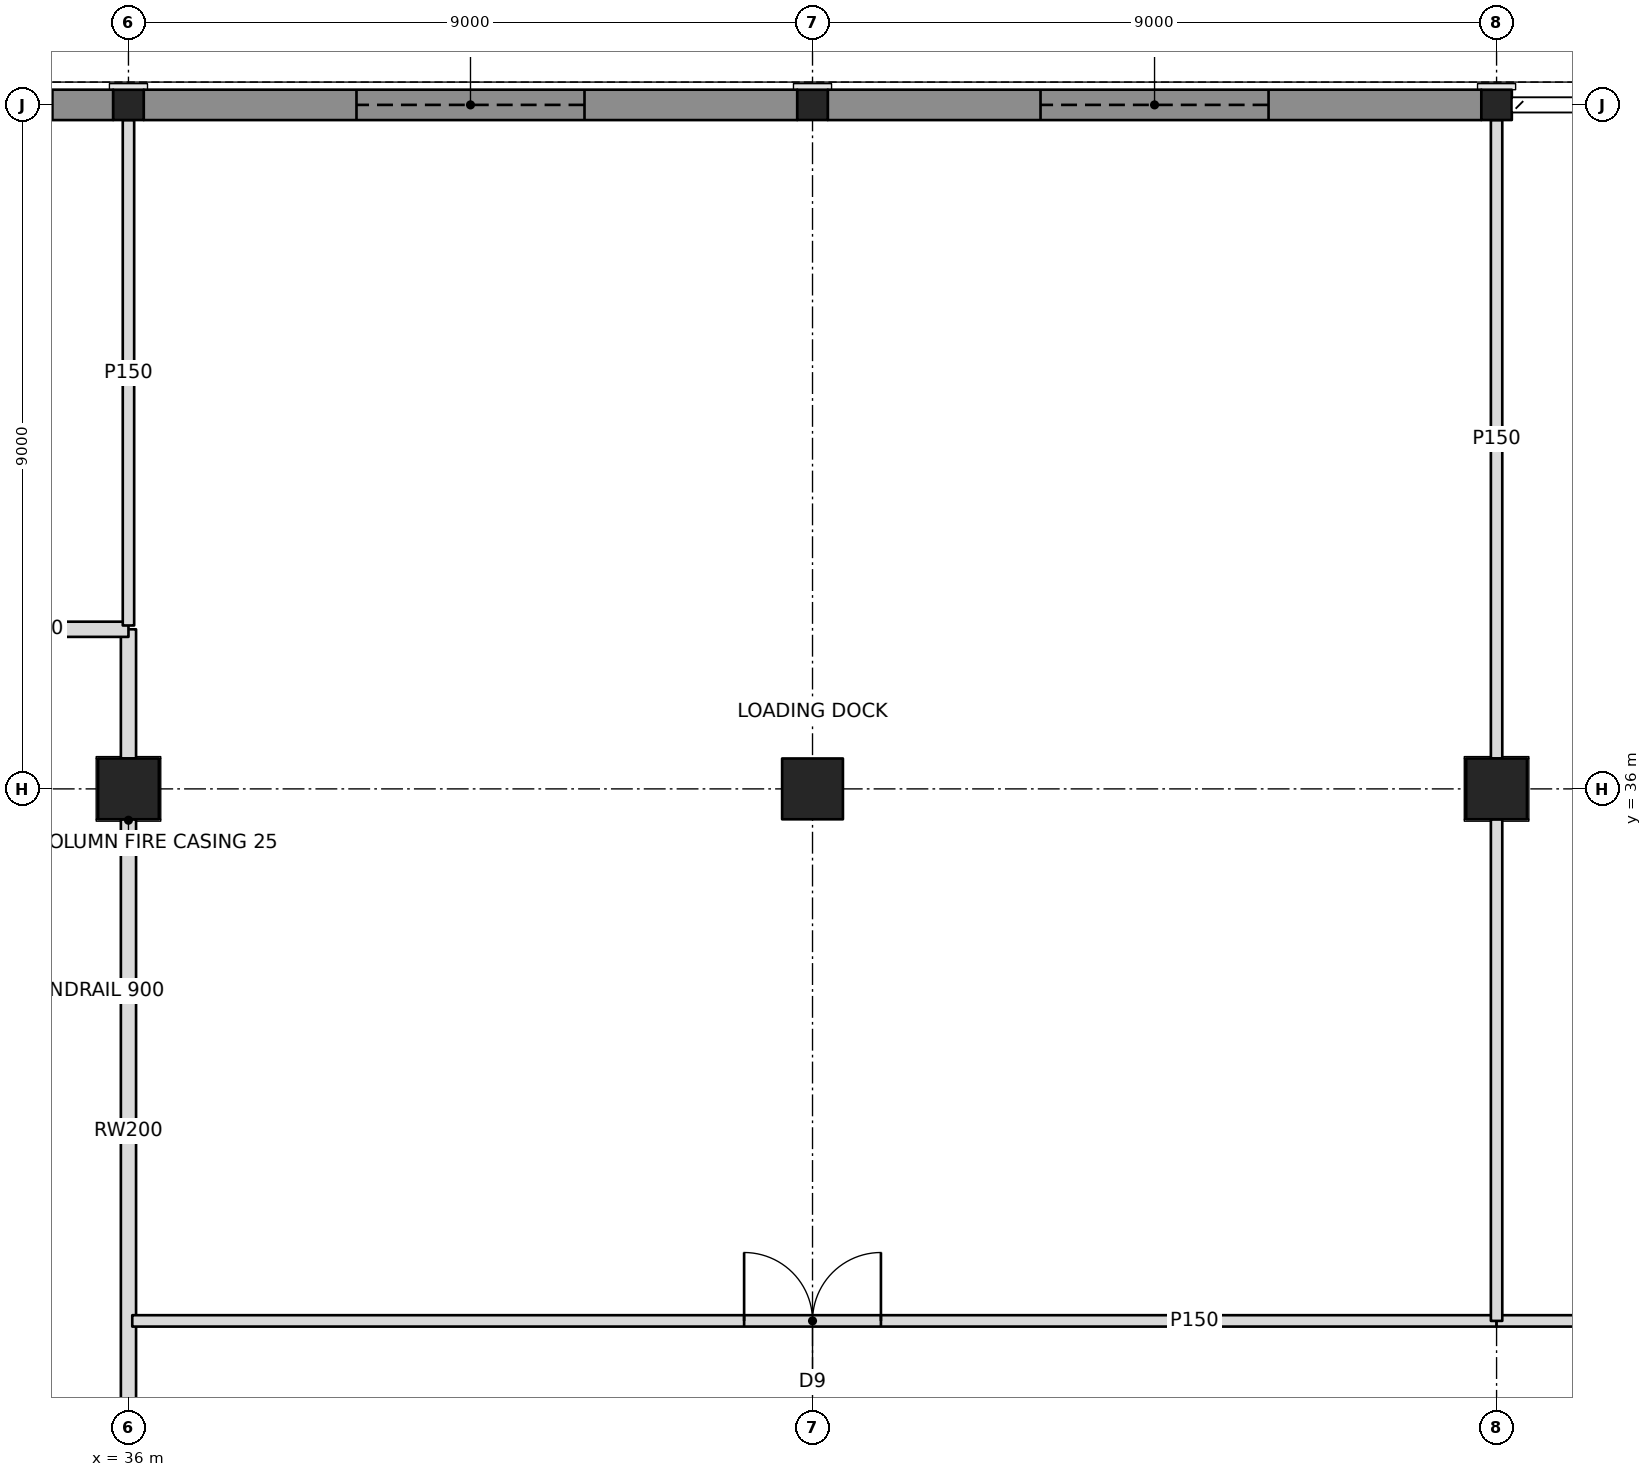
"""IFC4 building model, lengths in metres.
Left out: names, types, materials, properties, quantities, classifications, styles, units other than length and angle.
Written with IfcOpenShell. Run it as: python <this file> out.ifc"""

import sys

from ifc_helpers import new_model, si_unit, direction, frame, frame_2d, origin, origin_2d, place, context, subcontext, project, spatial, rectangle, hollow_rectangle, i_section, extrude, element, fill, save


model = new_model("IFC4")
c1 = context("Model", 3, precision=1e-05, world=origin(), true_north=direction((0.0, 1.0)))
c2 = subcontext(c1, "Body", "Model", "MODEL_VIEW")
j1 = project(units=[si_unit("LENGTHUNIT", "METRE"), si_unit("PLANEANGLEUNIT", "RADIAN")], contexts=[c1])
p1 = place(None, origin())
s1 = spatial("IfcSite", under=j1, at=p1, CompositionType="ELEMENT")
p2 = place(p1, origin())
s2 = spatial("IfcBuilding", under=s1, at=p2, CompositionType="ELEMENT")
p3 = place(p2, origin())
s3 = spatial("IfcBuildingStorey", under=s2, at=p3, CompositionType="ELEMENT", Elevation=0.0)
p4 = place(p3, frame((36.0, 36.0, 0.0), z_axis=(0.0, 0.0, 1.0), x_axis=(1.0, 0.0, 0.0)))
e1 = element("IfcColumn", 1, at=p4, inside=s3, PredefinedType="COLUMN", context=c2, shape_type="SweptSolid", body=[
    extrude(hollow_rectangle(XDim=0.8, YDim=0.8, WallThickness=0.1, at=origin_2d()), origin(), (0.0, 0.0, 1.0), 6.0),
])
p5 = place(p3, frame((36.0, 45.0, 0.0), z_axis=(0.0, 0.0, 1.0), x_axis=(1.0, 0.0, 0.0)))
e2 = element("IfcColumn", 2, at=p5, inside=s3, PredefinedType="COLUMN", context=c2, shape_type="SweptSolid", body=[
    extrude(i_section(OverallWidth=0.401, OverallDepth=0.399, WebThickness=0.025, FlangeThickness=0.04, at=origin_2d()), origin(), (0.0, 0.0, 1.0), 6.0),
])
p6 = place(p3, frame((45.0, 36.0, 0.0), z_axis=(0.0, 0.0, 1.0), x_axis=(1.0, 0.0, 0.0)))
e3 = element("IfcColumn", 3, at=p6, inside=s3, PredefinedType="COLUMN", context=c2, shape_type="SweptSolid", body=[
    extrude(hollow_rectangle(XDim=0.8, YDim=0.8, WallThickness=0.1, at=origin_2d()), origin(), (0.0, 0.0, 1.0), 6.0),
])
p7 = place(p3, frame((45.0, 45.0, 0.0), z_axis=(0.0, 0.0, 1.0), x_axis=(1.0, 0.0, 0.0)))
e4 = element("IfcColumn", 4, at=p7, inside=s3, PredefinedType="COLUMN", context=c2, shape_type="SweptSolid", body=[
    extrude(i_section(OverallWidth=0.401, OverallDepth=0.399, WebThickness=0.025, FlangeThickness=0.04, at=origin_2d()), origin(), (0.0, 0.0, 1.0), 6.0),
])
p8 = place(p3, frame((54.0, 36.0, 0.0), z_axis=(0.0, 0.0, 1.0), x_axis=(1.0, 0.0, 0.0)))
e5 = element("IfcColumn", 5, at=p8, inside=s3, PredefinedType="COLUMN", context=c2, shape_type="SweptSolid", body=[
    extrude(hollow_rectangle(XDim=0.8, YDim=0.8, WallThickness=0.1, at=origin_2d()), origin(), (0.0, 0.0, 1.0), 6.0),
])
p9 = place(p3, frame((54.0, 45.0, 0.0), z_axis=(0.0, 0.0, 1.0), x_axis=(1.0, 0.0, 0.0)))
e6 = element("IfcColumn", 6, at=p9, inside=s3, PredefinedType="COLUMN", context=c2, shape_type="SweptSolid", body=[
    extrude(i_section(OverallWidth=0.401, OverallDepth=0.399, WebThickness=0.025, FlangeThickness=0.04, at=origin_2d()), origin(), (0.0, 0.0, 1.0), 6.0),
])
p10 = place(p3, frame((35.799, 45.0, 0.0), z_axis=(0.0, 0.0, 1.0), x_axis=(-1.0, 0.0, 0.0)))
e7 = element("IfcWall", 7, at=p10, inside=s3, PredefinedType="SOLIDWALL", context=c2, shape_type="SweptSolid", body=[
    extrude(rectangle(XDim=8.599, YDim=0.4, at=frame_2d((4.299, 0.0))), origin(), (0.0, 0.0, 1.0), 5.054),
])
p11 = place(p10, frame((0.8, 0.0, 0.0)))
e8 = element("IfcOpeningElement", 8, at=p11, cuts=e7, PredefinedType="OPENING", context=c2, shape_type="SweptSolid", body=[
    extrude(rectangle(XDim=1.0, YDim=2.1, at=frame_2d((0.5, 1.05))), frame((0.0, 0.21, 0.0), z_axis=(0.0, -1.0, 0.0), x_axis=(1.0, 0.0, 0.0)), (0.0, 0.0, 1.0), 0.42),
])
p12 = place(p10, frame((3.2, 0.0, 0.0)))
e9 = element("IfcOpeningElement", 9, at=p12, cuts=e7, PredefinedType="OPENING", context=c2, shape_type="SweptSolid", body=[
    extrude(rectangle(XDim=2.4, YDim=2.7, at=frame_2d((1.2, 1.35))), frame((0.0, 0.21, 0.0), z_axis=(0.0, -1.0, 0.0), x_axis=(1.0, 0.0, 0.0)), (0.0, 0.0, 1.0), 0.42),
])
p13 = place(p3, frame((44.799, 45.0, 0.0), z_axis=(0.0, 0.0, 1.0), x_axis=(-1.0, 0.0, 0.0)))
e10 = element("IfcWall", 10, at=p13, inside=s3, PredefinedType="SOLIDWALL", context=c2, shape_type="SweptSolid", body=[
    extrude(rectangle(XDim=8.599, YDim=0.4, at=frame_2d((4.299, 0.0))), origin(), (0.0, 0.0, 1.0), 5.054),
])
p14 = place(p13, frame((2.799, 0.0, 0.0)))
e11 = element("IfcOpeningElement", 11, at=p14, cuts=e10, PredefinedType="OPENING", context=c2, shape_type="SweptSolid", body=[
    extrude(rectangle(XDim=3.0, YDim=4.2, at=frame_2d((1.5, 2.1))), frame((0.0, 0.21, 0.0), z_axis=(0.0, -1.0, 0.0), x_axis=(1.0, 0.0, 0.0)), (0.0, 0.0, 1.0), 0.42),
])
p15 = place(p3, frame((53.799, 45.0, 0.0), z_axis=(0.0, 0.0, 1.0), x_axis=(-1.0, 0.0, 0.0)))
e12 = element("IfcWall", 12, at=p15, inside=s3, PredefinedType="SOLIDWALL", context=c2, shape_type="SweptSolid", body=[
    extrude(rectangle(XDim=8.599, YDim=0.4, at=frame_2d((4.299, 0.0))), origin(), (0.0, 0.0, 1.0), 5.054),
])
p16 = place(p15, frame((2.799, 0.0, 0.0)))
e13 = element("IfcOpeningElement", 13, at=p16, cuts=e12, PredefinedType="OPENING", context=c2, shape_type="SweptSolid", body=[
    extrude(rectangle(XDim=3.0, YDim=4.2, at=frame_2d((1.5, 2.1))), frame((0.0, 0.21, 0.0), z_axis=(0.0, -1.0, 0.0), x_axis=(1.0, 0.0, 0.0)), (0.0, 0.0, 1.0), 0.42),
])
p17 = place(p3, frame((36.0, 38.15, 0.0), z_axis=(0.0, 0.0, 1.0), x_axis=(0.0, 1.0, 0.0)))
e14 = element("IfcWall", 14, at=p17, inside=s3, PredefinedType="PARTITIONING", context=c2, shape_type="SweptSolid", body=[
    extrude(rectangle(XDim=6.651, YDim=0.15, at=frame_2d((3.325, 0.0))), origin(), (0.0, 0.0, 1.0), 4.892),
])
p18 = place(p3, frame((54.0, 29.0, 0.0), z_axis=(0.0, 0.0, 1.0), x_axis=(-1.0, 0.0, 0.0)))
e15 = element("IfcWall", 15, at=p18, inside=s3, PredefinedType="PARTITIONING", context=c2, shape_type="SweptSolid", body=[
    extrude(rectangle(XDim=17.95, YDim=0.15, at=frame_2d((8.975, 0.0))), origin(), (0.0, 0.0, 1.0), 4.891),
])
p19 = place(p18, frame((8.1, 0.0, 0.0)))
e16 = element("IfcOpeningElement", 16, at=p19, cuts=e15, PredefinedType="OPENING", context=c2, shape_type="SweptSolid", body=[
    extrude(rectangle(XDim=1.8, YDim=2.4, at=frame_2d((0.9, 1.2))), frame((0.0, 0.085, 0.0), z_axis=(0.0, -1.0, 0.0), x_axis=(1.0, 0.0, 0.0)), (0.0, 0.0, 1.0), 0.17),
])
p20 = place(p3, frame((58.2, 29.0, 0.0), z_axis=(0.0, 0.0, 1.0), x_axis=(-1.0, 0.0, 0.0)))
e17 = element("IfcWall", 17, at=p20, inside=s3, PredefinedType="PARTITIONING", context=c2, shape_type="SweptSolid", body=[
    extrude(rectangle(XDim=4.2, YDim=0.15, at=frame_2d((2.1, 0.0))), origin(), (0.0, 0.0, 1.0), 4.891),
])
p21 = place(p20, frame((1.3, 0.0, 0.0)))
e18 = element("IfcOpeningElement", 18, at=p21, cuts=e17, PredefinedType="OPENING", context=c2, shape_type="SweptSolid", body=[
    extrude(rectangle(XDim=1.0, YDim=2.1, at=frame_2d((0.5, 1.05))), frame((0.0, 0.085, 0.0), z_axis=(0.0, -1.0, 0.0), x_axis=(1.0, 0.0, 0.0)), (0.0, 0.0, 1.0), 0.17),
])
p22 = place(p3, frame((54.0, 44.801, 0.0), z_axis=(0.0, 0.0, 1.0), x_axis=(0.0, -1.0, 0.0)))
e19 = element("IfcWall", 19, at=p22, inside=s3, PredefinedType="PARTITIONING", context=c2, shape_type="SweptSolid", body=[
    extrude(rectangle(XDim=8.401, YDim=0.15, at=frame_2d((4.2, 0.0))), origin(), (0.0, 0.0, 1.0), 4.892),
])
p23 = place(p3, frame((54.0, 35.6, 0.0), z_axis=(0.0, 0.0, 1.0), x_axis=(0.0, -1.0, 0.0)))
e20 = element("IfcWall", 20, at=p23, inside=s3, PredefinedType="PARTITIONING", context=c2, shape_type="SweptSolid", body=[
    extrude(rectangle(XDim=6.6, YDim=0.15, at=frame_2d((3.3, 0.0))), origin(), (0.0, 0.0, 1.0), 4.892),
])
p24 = place(p3, frame((36.0, 27.4, 0.0), z_axis=(0.0, 0.0, 1.0), x_axis=(0.0, 1.0, 0.0)))
e21 = element("IfcWall", 21, at=p24, inside=s3, PredefinedType="PARTITIONING", context=c2, shape_type="SweptSolid", body=[
    extrude(rectangle(XDim=8.2, YDim=0.2, at=frame_2d((4.1, 0.0))), origin(), (0.0, 0.0, 1.0), 4.892),
])
p25 = place(p3, frame((36.0, 36.4, 0.0), z_axis=(0.0, 0.0, 1.0), x_axis=(0.0, 1.0, 0.0)))
e22 = element("IfcWall", 22, at=p25, inside=s3, PredefinedType="PARTITIONING", context=c2, shape_type="SweptSolid", body=[
    extrude(rectangle(XDim=1.7, YDim=0.2, at=frame_2d((0.85, 0.0))), origin(), (0.0, 0.0, 1.0), 4.892),
])
p26 = place(p3, frame((33.4, 38.1, 0.0), z_axis=(0.0, 0.0, 1.0), x_axis=(1.0, 0.0, 0.0)))
e23 = element("IfcWall", 23, at=p26, inside=s3, PredefinedType="PARTITIONING", context=c2, shape_type="SweptSolid", body=[
    extrude(rectangle(XDim=2.6, YDim=0.2, at=frame_2d((1.3, 0.0))), origin(), (0.0, 0.0, 1.0), 4.891),
])
p27 = place(p14, origin())
e24 = element("IfcDoor", 24, at=p27, inside=s3, OperationType="ROLLINGUP", PredefinedType="DOOR", context=c2, shape_type="SweptSolid", body=[
    extrude(rectangle(XDim=3.0, YDim=4.2, at=frame_2d((1.5, 2.1))), frame((0.0, 0.025, 0.0), z_axis=(0.0, -1.0, 0.0), x_axis=(1.0, 0.0, 0.0)), (0.0, 0.0, 1.0), 0.05),
])
fill(e11, e24)
p28 = place(p16, origin())
e25 = element("IfcDoor", 25, at=p28, inside=s3, OperationType="ROLLINGUP", PredefinedType="DOOR", context=c2, shape_type="SweptSolid", body=[
    extrude(rectangle(XDim=3.0, YDim=4.2, at=frame_2d((1.5, 2.1))), frame((0.0, 0.025, 0.0), z_axis=(0.0, -1.0, 0.0), x_axis=(1.0, 0.0, 0.0)), (0.0, 0.0, 1.0), 0.05),
])
fill(e13, e25)
p29 = place(p19, frame((1.8, 0.0, 0.0), z_axis=(0.0, 0.0, 1.0), x_axis=(-1.0, 0.0, 0.0)))
e26 = element("IfcDoor", 26, at=p29, inside=s3, OperationType="DOUBLE_DOOR_SINGLE_SWING", PredefinedType="DOOR", context=c2, shape_type="SweptSolid", body=[
    extrude(rectangle(XDim=1.8, YDim=2.4, at=frame_2d((0.9, 1.2))), frame((0.0, 0.025, 0.0), z_axis=(0.0, -1.0, 0.0), x_axis=(1.0, 0.0, 0.0)), (0.0, 0.0, 1.0), 0.05),
])
fill(e16, e26)
save(model, sys.argv[1])
